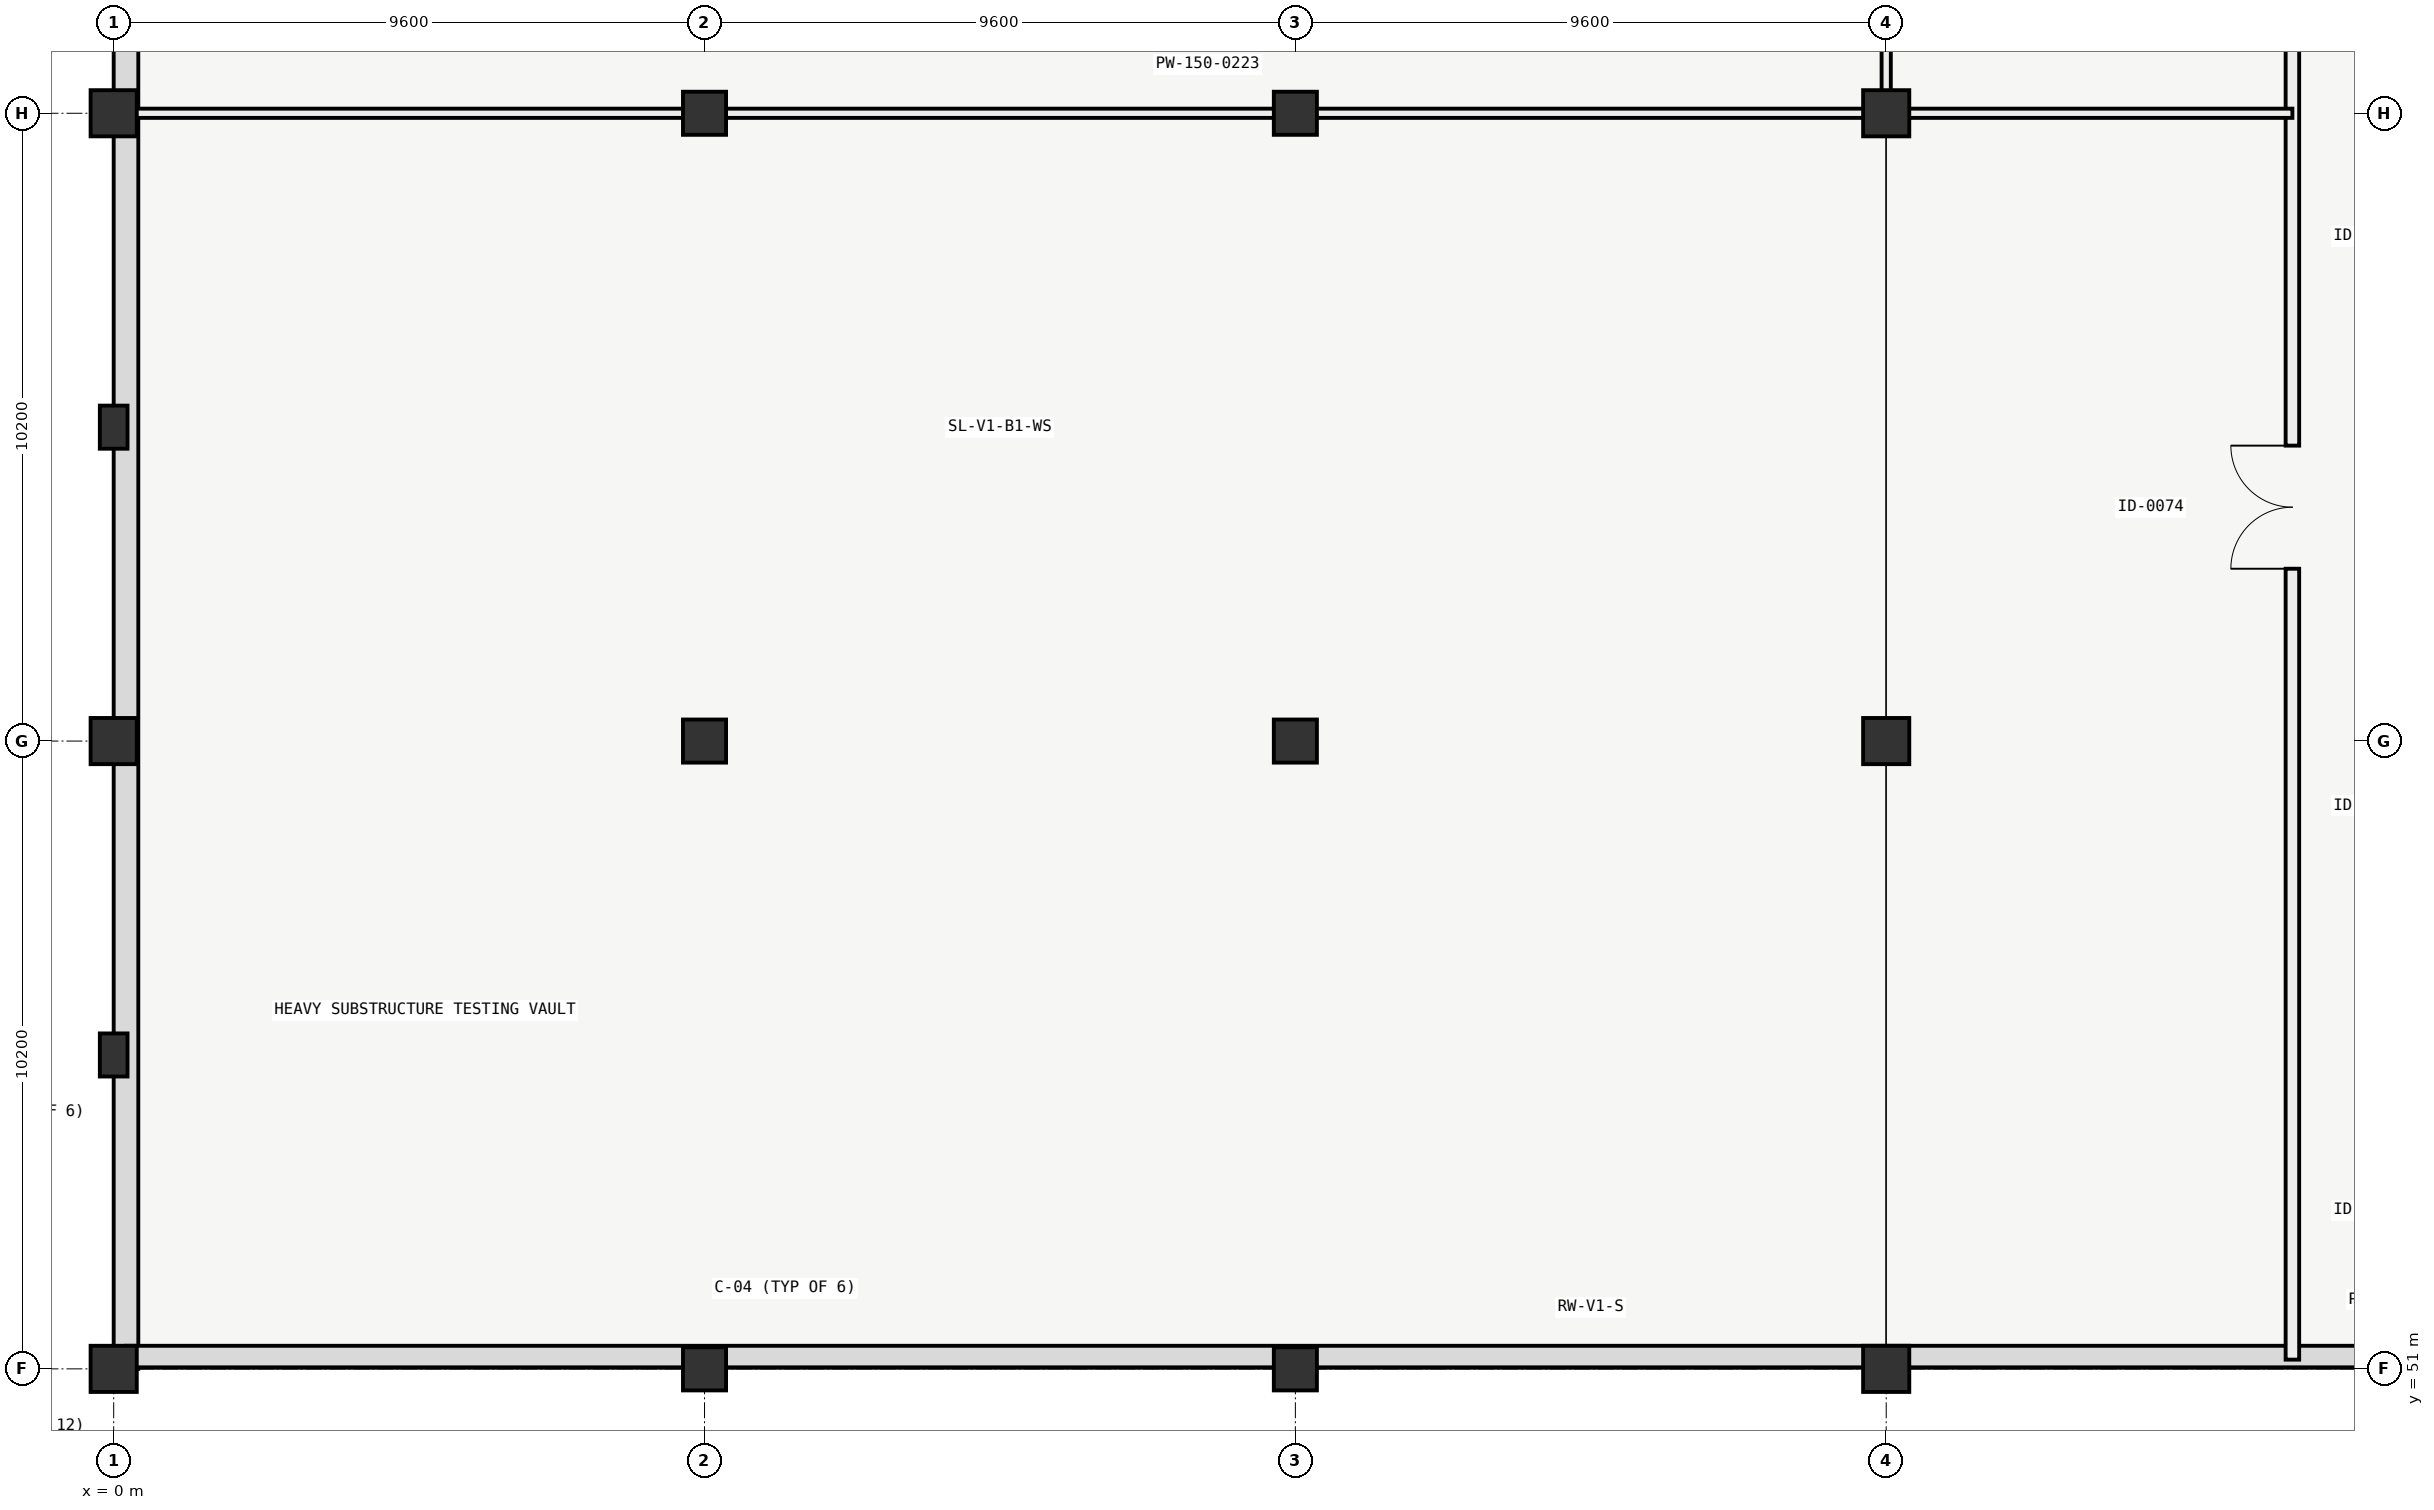
"""IFC4 building model, lengths in metres.
Left out: names, types, materials, properties, quantities, classifications, styles, units other than length and angle.
Written with IfcOpenShell. Run it as: python <this file> out.ifc"""

import sys

from ifc_helpers import new_model, si_unit, direction, frame, frame_2d, origin, origin_2d, place, context, subcontext, project, spatial, rectangle, extrude, element, fill, save


model = new_model("IFC4")
c1 = context("Model", 3, precision=1e-05, world=origin(), true_north=direction((0.0, 1.0)))
c2 = subcontext(c1, "Body", "Model", "MODEL_VIEW")
j1 = project(units=[si_unit("LENGTHUNIT", "METRE"), si_unit("PLANEANGLEUNIT", "RADIAN")], contexts=[c1])
p1 = place(None, origin())
s1 = spatial("IfcSite", under=j1, at=p1, CompositionType="ELEMENT")
p2 = place(p1, origin())
s2 = spatial("IfcBuilding", under=s1, at=p2, CompositionType="ELEMENT")
p3 = place(p2, frame((0.0, 0.0, -4.2)))
s3 = spatial("IfcBuildingStorey", under=s2, at=p3, CompositionType="ELEMENT", Elevation=-4.2)
for number, where, z_axis, x_axis in (
    (1, (9.6, 51.0, 0.0), (0.0, 0.0, 1.0), (1.0, 0.0, 0.0)),
    (2, (19.2, 51.0, 0.0), (0.0, 0.0, 1.0), (1.0, 0.0, 0.0)),
):
    element("IfcColumn", number, at=place(p3, frame(where, z_axis=z_axis, x_axis=x_axis)), inside=s3, PredefinedType="COLUMN", context=c2, shape_type="SweptSolid", body=[
        extrude(rectangle(XDim=0.7, YDim=0.7, at=origin_2d()), origin(), (0.0, 0.0, 1.0), 4.2),
    ])
for number, where, z_axis, x_axis in (
    (3, (0.0, 51.0, 0.0), (0.0, 0.0, 1.0), (1.0, 0.0, 0.0)),
    (4, (28.8, 51.0, 0.0), (0.0, 0.0, 1.0), (1.0, 0.0, 0.0)),
):
    element("IfcColumn", number, at=place(p3, frame(where, z_axis=z_axis, x_axis=x_axis)), inside=s3, PredefinedType="COLUMN", context=c2, shape_type="SweptSolid", body=[
        extrude(rectangle(XDim=0.75, YDim=0.75, at=origin_2d()), origin(), (0.0, 0.0, 1.0), 4.2),
    ])
for number, where, z_axis, x_axis in (
    (5, (9.6, 61.2, 0.0), (0.0, 0.0, 1.0), (1.0, 0.0, 0.0)),
    (6, (19.2, 61.2, 0.0), (0.0, 0.0, 1.0), (1.0, 0.0, 0.0)),
):
    element("IfcColumn", number, at=place(p3, frame(where, z_axis=z_axis, x_axis=x_axis)), inside=s3, PredefinedType="COLUMN", context=c2, shape_type="SweptSolid", body=[
        extrude(rectangle(XDim=0.7, YDim=0.7, at=origin_2d()), origin(), (0.0, 0.0, 1.0), 4.2),
    ])
for number, where, z_axis, x_axis in (
    (7, (0.0, 61.2, 0.0), (0.0, 0.0, 1.0), (1.0, 0.0, 0.0)),
    (8, (28.8, 61.2, 0.0), (0.0, 0.0, 1.0), (1.0, 0.0, 0.0)),
):
    element("IfcColumn", number, at=place(p3, frame(where, z_axis=z_axis, x_axis=x_axis)), inside=s3, PredefinedType="COLUMN", context=c2, shape_type="SweptSolid", body=[
        extrude(rectangle(XDim=0.75, YDim=0.75, at=origin_2d()), origin(), (0.0, 0.0, 1.0), 4.2),
    ])
for number, where, z_axis, x_axis in (
    (9, (9.6, 71.4, 0.0), (0.0, 0.0, 1.0), (1.0, 0.0, 0.0)),
    (10, (19.2, 71.4, 0.0), (0.0, 0.0, 1.0), (1.0, 0.0, 0.0)),
):
    element("IfcColumn", number, at=place(p3, frame(where, z_axis=z_axis, x_axis=x_axis)), inside=s3, PredefinedType="COLUMN", context=c2, shape_type="SweptSolid", body=[
        extrude(rectangle(XDim=0.7, YDim=0.7, at=origin_2d()), origin(), (0.0, 0.0, 1.0), 4.2),
    ])
for number, where, z_axis, x_axis in (
    (11, (0.0, 71.4, 0.0), (0.0, 0.0, 1.0), (1.0, 0.0, 0.0)),
    (12, (28.8, 71.4, 0.0), (0.0, 0.0, 1.0), (1.0, 0.0, 0.0)),
):
    element("IfcColumn", number, at=place(p3, frame(where, z_axis=z_axis, x_axis=x_axis)), inside=s3, PredefinedType="COLUMN", context=c2, shape_type="SweptSolid", body=[
        extrude(rectangle(XDim=0.75, YDim=0.75, at=origin_2d()), origin(), (0.0, 0.0, 1.0), 4.2),
    ])
for number, where, z_axis, x_axis in (
    (13, (0.0, 56.1, 0.0), (0.0, 0.0, 1.0), (1.0, 0.0, 0.0)),
    (14, (0.0, 66.3, 0.0), (0.0, 0.0, 1.0), (1.0, 0.0, 0.0)),
):
    element("IfcColumn", number, at=place(p3, frame(where, z_axis=z_axis, x_axis=x_axis)), inside=s3, PredefinedType="PILASTER", context=c2, shape_type="SweptSolid", body=[
        extrude(rectangle(XDim=0.45, YDim=0.7, at=origin_2d()), origin(), (0.0, 0.0, 1.0), 4.2),
    ])
p4 = place(p3, frame((0.2, 51.0, 0.0), z_axis=(0.0, 0.0, 1.0), x_axis=(0.0, 1.0, 0.0)))
e15 = element("IfcWall", 15, at=p4, inside=s3, PredefinedType="USERDEFINED", context=c2, shape_type="SweptSolid", body=[
    extrude(rectangle(XDim=71.4, YDim=0.4, at=frame_2d((35.7, 0.0))), origin(), (0.0, 0.0, 1.0), 3.9),
])
p5 = place(p3, frame((0.2, 51.2, 0.0), z_axis=(0.0, 0.0, 1.0), x_axis=(1.0, 0.0, 0.0)))
e16 = element("IfcWall", 16, at=p5, inside=s3, PredefinedType="USERDEFINED", context=c2, shape_type="SweptSolid", body=[
    extrude(rectangle(XDim=47.6, YDim=0.35, at=frame_2d((23.8, 0.0))), origin(), (0.0, 0.0, 1.0), 3.9),
])
p6 = place(p3, frame((35.4, 51.15, 0.0), z_axis=(0.0, 0.0, 1.0), x_axis=(0.0, 1.0, 0.0)))
e17 = element("IfcWall", 17, at=p6, inside=s3, PredefinedType="PARTITIONING", context=c2, shape_type="SweptSolid", body=[
    extrude(rectangle(XDim=42.25, YDim=0.22, at=frame_2d((21.125, 0.0))), origin(), (0.0, 0.0, 1.0), 3.268),
])
p7 = place(p6, frame((12.85, 0.0, 0.0)))
e18 = element("IfcOpeningElement", 18, at=p7, cuts=e17, PredefinedType="OPENING", context=c2, shape_type="SweptSolid", body=[
    extrude(rectangle(XDim=2.0, YDim=2.4, at=frame_2d((1.0, 1.2))), frame((0.0, 0.12, 0.0), z_axis=(0.0, -1.0, 0.0), x_axis=(1.0, 0.0, 0.0)), (0.0, 0.0, 1.0), 0.24),
])
p8 = place(p6, frame((31.25, 0.0, 0.0)))
e19 = element("IfcOpeningElement", 19, at=p8, cuts=e17, PredefinedType="OPENING", context=c2, shape_type="SweptSolid", body=[
    extrude(rectangle(XDim=1.5, YDim=2.2, at=frame_2d((0.75, 1.1))), frame((0.0, 0.12, 0.0), z_axis=(0.0, -1.0, 0.0), x_axis=(1.0, 0.0, 0.0)), (0.0, 0.0, 1.0), 0.24),
])
p9 = place(p3, frame((0.15, 71.4, 0.0), z_axis=(0.0, 0.0, 1.0), x_axis=(1.0, 0.0, 0.0)))
e20 = element("IfcWall", 20, at=p9, inside=s3, PredefinedType="PARTITIONING", context=c2, shape_type="SweptSolid", body=[
    extrude(rectangle(XDim=35.25, YDim=0.15, at=frame_2d((17.625, 0.0))), origin(), (0.0, 0.0, 1.0), 3.03),
])
p10 = place(p3, frame((28.8, 71.4, 0.0), z_axis=(0.0, 0.0, 1.0), x_axis=(0.0, 1.0, 0.0)))
e21 = element("IfcWall", 21, at=p10, inside=s3, PredefinedType="PARTITIONING", context=c2, shape_type="SweptSolid", body=[
    extrude(rectangle(XDim=50.85, YDim=0.15, at=frame_2d((25.425, 0.0))), origin(), (0.0, 0.0, 1.0), 3.03),
])
p11 = place(p10, frame((22.85, 0.0, 0.0)))
e22 = element("IfcOpeningElement", 22, at=p11, cuts=e21, PredefinedType="OPENING", context=c2, shape_type="SweptSolid", body=[
    extrude(rectangle(XDim=1.5, YDim=2.2, at=frame_2d((0.75, 1.1))), frame((0.0, 0.085, 0.0), z_axis=(0.0, -1.0, 0.0), x_axis=(1.0, 0.0, 0.0)), (0.0, 0.0, 1.0), 0.17),
])
p12 = place(p7, origin())
e23 = element("IfcDoor", 23, at=p12, inside=s3, OperationType="DOUBLE_DOOR_SINGLE_SWING", PredefinedType="DOOR", context=c2, shape_type="SweptSolid", body=[
    extrude(rectangle(XDim=2.0, YDim=2.4, at=frame_2d((1.0, 1.2))), frame((0.0, 0.025, 0.0), z_axis=(0.0, -1.0, 0.0), x_axis=(1.0, 0.0, 0.0)), (0.0, 0.0, 1.0), 0.05),
])
fill(e18, e23)
save(model, sys.argv[1])
